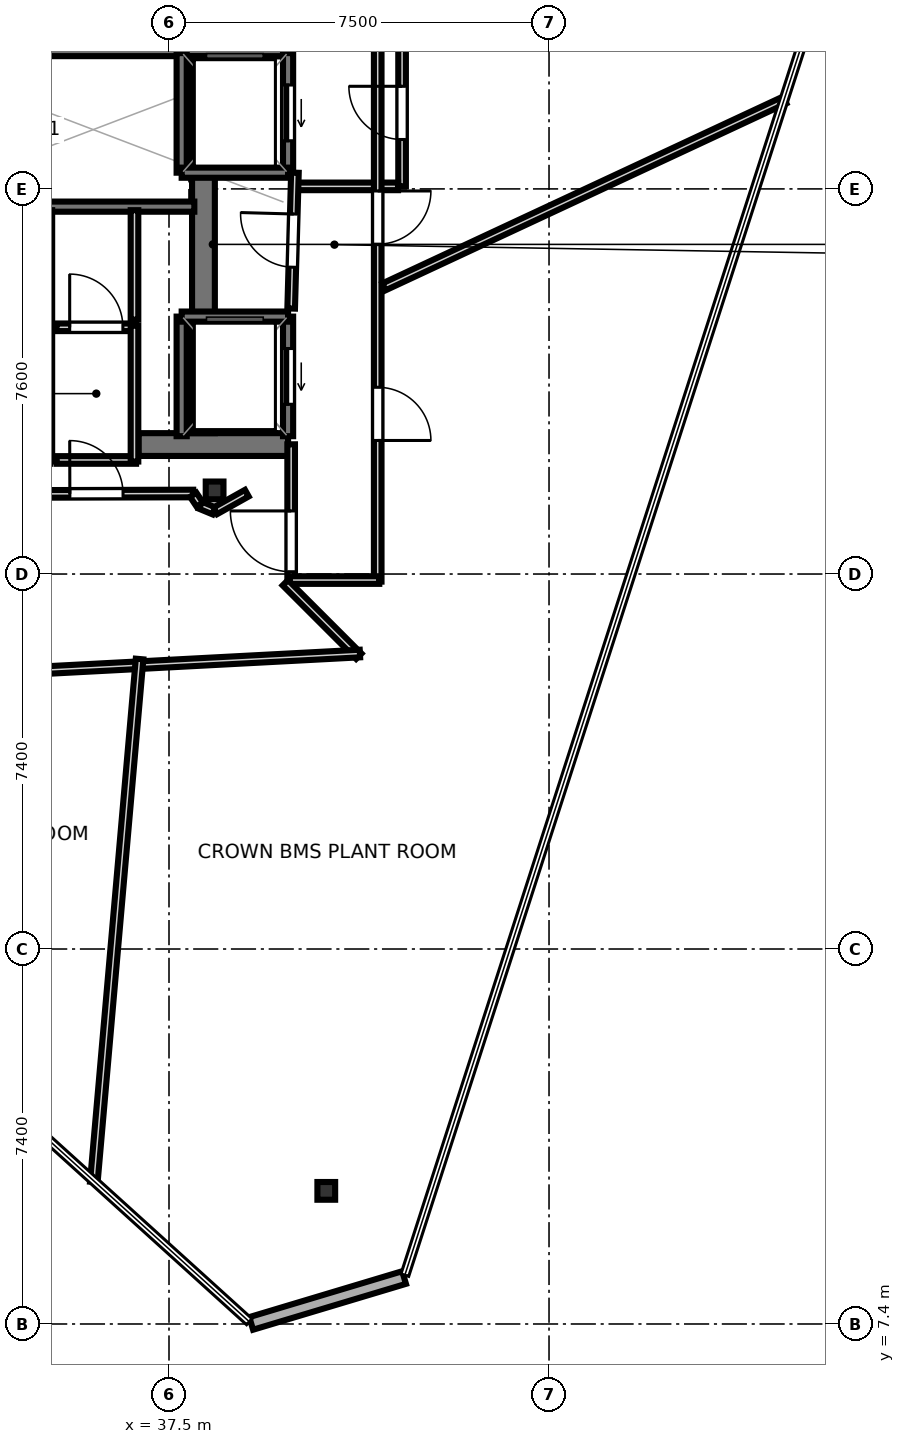
"""IFC4 building model, lengths in metres.
Left out: names, types, materials, properties, quantities, classifications, styles, units other than length and angle.
Written with IfcOpenShell. Run it as: python <this file> out.ifc"""

import sys

from ifc_helpers import new_model, si_unit, direction, frame, frame_2d, origin, origin_2d, place, context, subcontext, project, spatial, rectangle, i_section, extrude, element, fill, save


model = new_model("IFC4")
c1 = context("Model", 3, precision=1e-05, world=origin(), true_north=direction((0.0, 1.0)))
c2 = subcontext(c1, "Body", "Model", "MODEL_VIEW")
j1 = project(units=[si_unit("LENGTHUNIT", "METRE"), si_unit("PLANEANGLEUNIT", "RADIAN")], contexts=[c1])
p1 = place(None, origin())
s1 = spatial("IfcSite", under=j1, at=p1, CompositionType="ELEMENT")
p2 = place(p1, origin())
s2 = spatial("IfcBuilding", under=s1, at=p2, CompositionType="ELEMENT")
p3 = place(p2, frame((0.0, 0.0, 360.05)))
s3 = spatial("IfcBuildingStorey", under=s2, at=p3, CompositionType="ELEMENT", Elevation=360.05)
p4 = place(p3, frame((29.33, 32.645, 0.0), z_axis=(0.0, 0.0, 1.0), x_axis=(1.0, 0.0, 0.0)))
e1 = element("IfcWall", 1, at=p4, inside=s3, PredefinedType="SHEAR", context=c2, shape_type="SweptSolid", body=[
    extrude(rectangle(XDim=10.52, YDim=0.45, at=frame_2d((5.26, 0.0))), origin(), (0.0, 0.0, 1.0), 3.55),
])
p5 = place(p3, frame((36.9, 24.755, 0.0), z_axis=(0.0, 0.0, 1.0), x_axis=(1.0, 0.0, 0.0)))
e2 = element("IfcWall", 2, at=p5, inside=s3, PredefinedType="SHEAR", context=c2, shape_type="SweptSolid", body=[
    extrude(rectangle(XDim=2.95, YDim=0.45, at=frame_2d((1.475, 0.0))), origin(), (0.0, 0.0, 1.0), 3.55),
])
p6 = place(p3, frame((38.18, 24.98, 0.0), z_axis=(0.0, 0.0, 1.0), x_axis=(0.0, 1.0, 0.0)))
e3 = element("IfcWall", 3, at=p6, inside=s3, PredefinedType="SHEAR", context=c2, shape_type="SweptSolid", body=[
    extrude(rectangle(XDim=7.44, YDim=0.45, at=frame_2d((3.72, 0.0))), origin(), (0.0, 0.0, 1.0), 3.55),
])
for number, where, z_axis, x_axis in (
    (4, (38.4, 23.85, 0.0), (0.0, 0.0, 1.0), (1.0, 0.0, 0.0)),
    (5, (40.604, 10.027, 0.0), (0.0, 0.0, 1.0), (1.0, 0.0, 0.0)),
):
    element("IfcColumn", number, at=place(p3, frame(where, z_axis=z_axis, x_axis=x_axis)), inside=s3, PredefinedType="COLUMN", context=c2, shape_type="SweptSolid", body=[
        extrude(i_section(OverallWidth=0.35, OverallDepth=0.35, WebThickness=0.012, FlangeThickness=0.019, at=origin_2d()), origin(), (0.0, 0.0, 1.0), 3.75),
    ])
p7 = place(p3, frame((39.122, 7.411, 0.0), z_axis=(0.0, 0.0, 1.0), x_axis=(0.957819885919, 0.287369215712, 0.0)))
e6 = element("IfcWall", 6, at=p7, inside=s3, PredefinedType="SOLIDWALL", context=c2, shape_type="SweptSolid", body=[
    extrude(rectangle(XDim=3.15, YDim=0.26, at=frame_2d((1.575, 0.0))), origin(), (0.0, 0.0, 1.0), 3.55),
])
p8 = place(p3, frame((29.7, 29.45, 0.0), z_axis=(0.0, 0.0, 1.0), x_axis=(1.0, 0.0, 0.0)))
e7 = element("IfcWall", 7, at=p8, inside=s3, PredefinedType="SOLIDWALL", context=c2, shape_type="SweptSolid", body=[
    extrude(rectangle(XDim=8.3, YDim=0.2, at=frame_2d((4.15, 0.0))), origin(), (0.0, 0.0, 1.0), 3.55),
])
p9 = place(p8, frame((0.595, 0.0, 0.0)))
e8 = element("IfcOpeningElement", 8, at=p9, cuts=e7, PredefinedType="OPENING", context=c2, shape_type="SweptSolid", body=[
    extrude(rectangle(XDim=1.25, YDim=2.15, at=frame_2d((0.625, 1.075))), frame((0.0, 0.11, 0.0), z_axis=(0.0, -1.0, 0.0), x_axis=(1.0, 0.0, 0.0)), (0.0, 0.0, 1.0), 0.22),
])
p10 = place(p3, frame((39.85, 30.12, 0.0), z_axis=(0.0, 0.0, 1.0), x_axis=(0.0, 1.0, 0.0)))
e9 = element("IfcWall", 9, at=p10, inside=s3, PredefinedType="SOLIDWALL", context=c2, shape_type="SweptSolid", body=[
    extrude(rectangle(XDim=2.36, YDim=0.2, at=frame_2d((1.18, 0.0))), origin(), (0.0, 0.0, 1.0), 3.55),
])
p11 = place(p10, frame((0.63, 0.0, 0.0)))
e10 = element("IfcOpeningElement", 10, at=p11, cuts=e9, PredefinedType="OPENING", context=c2, shape_type="SweptSolid", body=[
    extrude(rectangle(XDim=1.1, YDim=2.15, at=frame_2d((0.55, 1.075))), frame((0.0, 0.11, 0.0), z_axis=(0.0, -1.0, 0.0), x_axis=(1.0, 0.0, 0.0)), (0.0, 0.0, 1.0), 0.22),
])
p12 = place(p3, frame((37.75, 30.12, 0.0), z_axis=(0.0, 0.0, 1.0), x_axis=(0.0, 1.0, 0.0)))
e11 = element("IfcWall", 11, at=p12, inside=s3, PredefinedType="SOLIDWALL", context=c2, shape_type="SweptSolid", body=[
    extrude(rectangle(XDim=2.36, YDim=0.2, at=frame_2d((1.18, 0.0))), origin(), (0.0, 0.0, 1.0), 3.55),
])
p13 = place(p3, frame((37.75, 30.12, 0.0), z_axis=(0.0, 0.0, 1.0), x_axis=(1.0, 0.0, 0.0)))
e12 = element("IfcWall", 12, at=p13, inside=s3, PredefinedType="SOLIDWALL", context=c2, shape_type="SweptSolid", body=[
    extrude(rectangle(XDim=2.1, YDim=0.2, at=frame_2d((1.05, 0.0))), origin(), (0.0, 0.0, 1.0), 3.55),
])
p14 = place(p3, frame((39.85, 24.92, 0.0), z_axis=(0.0, 0.0, 1.0), x_axis=(0.0, 1.0, 0.0)))
e13 = element("IfcWall", 13, at=p14, inside=s3, PredefinedType="SOLIDWALL", context=c2, shape_type="SweptSolid", body=[
    extrude(rectangle(XDim=2.36, YDim=0.2, at=frame_2d((1.18, 0.0))), origin(), (0.0, 0.0, 1.0), 3.55),
])
p15 = place(p14, frame((0.63, 0.0, 0.0)))
e14 = element("IfcOpeningElement", 14, at=p15, cuts=e13, PredefinedType="OPENING", context=c2, shape_type="SweptSolid", body=[
    extrude(rectangle(XDim=1.1, YDim=2.15, at=frame_2d((0.55, 1.075))), frame((0.0, 0.11, 0.0), z_axis=(0.0, -1.0, 0.0), x_axis=(1.0, 0.0, 0.0)), (0.0, 0.0, 1.0), 0.22),
])
p16 = place(p3, frame((37.75, 24.92, 0.0), z_axis=(0.0, 0.0, 1.0), x_axis=(0.0, 1.0, 0.0)))
e15 = element("IfcWall", 15, at=p16, inside=s3, PredefinedType="SOLIDWALL", context=c2, shape_type="SweptSolid", body=[
    extrude(rectangle(XDim=2.36, YDim=0.2, at=frame_2d((1.18, 0.0))), origin(), (0.0, 0.0, 1.0), 3.55),
])
p17 = place(p3, frame((37.75, 27.28, 0.0), z_axis=(0.0, 0.0, 1.0), x_axis=(1.0, 0.0, 0.0)))
e16 = element("IfcWall", 16, at=p17, inside=s3, PredefinedType="SOLIDWALL", context=c2, shape_type="SweptSolid", body=[
    extrude(rectangle(XDim=2.1, YDim=0.2, at=frame_2d((1.05, 0.0))), origin(), (0.0, 0.0, 1.0), 3.55),
])
p18 = place(p3, frame((42.1, 29.85, 0.0), z_axis=(0.0, 0.0, 1.0), x_axis=(0.0, 1.0, 0.0)))
e17 = element("IfcWall", 17, at=p18, inside=s3, PredefinedType="PARTITIONING", context=c2, shape_type="SweptSolid", body=[
    extrude(rectangle(XDim=2.795, YDim=0.15, at=frame_2d((1.397, 0.0))), origin(), (0.0, 0.0, 1.0), 2.87),
])
p19 = place(p18, frame((0.925, 0.0, 0.0)))
e18 = element("IfcOpeningElement", 18, at=p19, cuts=e17, PredefinedType="OPENING", context=c2, shape_type="SweptSolid", body=[
    extrude(rectangle(XDim=1.05, YDim=2.15, at=frame_2d((0.525, 1.075))), frame((0.0, 0.085, 0.0), z_axis=(0.0, -1.0, 0.0), x_axis=(1.0, 0.0, 0.0)), (0.0, 0.0, 1.0), 0.17),
])
p20 = place(p3, frame((39.96, 29.85, 0.0), z_axis=(0.0, 0.0, 1.0), x_axis=(1.0, 0.0, 0.0)))
e19 = element("IfcWall", 19, at=p20, inside=s3, PredefinedType="PARTITIONING", context=c2, shape_type="SweptSolid", body=[
    extrude(rectangle(XDim=2.06, YDim=0.15, at=frame_2d((1.03, 0.0))), origin(), (0.0, 0.0, 1.0), 2.87),
])
p21 = place(p3, frame((39.911, 22.05, 0.0), z_axis=(0.0, 0.0, 1.0), x_axis=(0.0, 1.0, 0.0)))
e20 = element("IfcWall", 20, at=p21, inside=s3, PredefinedType="PARTITIONING", context=c2, shape_type="SweptSolid", body=[
    extrude(rectangle(XDim=2.71, YDim=0.15, at=frame_2d((1.355, 0.0))), origin(), (0.0, 0.0, 1.0), 2.87),
])
p22 = place(p21, frame((0.195, 0.0, 0.0)))
e21 = element("IfcOpeningElement", 21, at=p22, cuts=e20, PredefinedType="OPENING", context=c2, shape_type="SweptSolid", body=[
    extrude(rectangle(XDim=1.2, YDim=2.15, at=frame_2d((0.6, 1.075))), frame((0.0, 0.085, 0.0), z_axis=(0.0, -1.0, 0.0), x_axis=(1.0, 0.0, 0.0)), (0.0, 0.0, 1.0), 0.17),
])
p23 = place(p3, frame((39.911, 27.439, 0.0), z_axis=(0.0, 0.0, 1.0), x_axis=(0.027673579092, 0.999617013171, 0.0)))
e22 = element("IfcWall", 22, at=p23, inside=s3, PredefinedType="PARTITIONING", context=c2, shape_type="SweptSolid", body=[
    extrude(rectangle(XDim=2.682, YDim=0.15, at=frame_2d((1.341, 0.0))), origin(), (0.0, 0.0, 1.0), 2.87),
])
p24 = place(p23, frame((0.816, 0.0, 0.0)))
e23 = element("IfcOpeningElement", 23, at=p24, cuts=e22, PredefinedType="OPENING", context=c2, shape_type="SweptSolid", body=[
    extrude(rectangle(XDim=1.05, YDim=2.15, at=frame_2d((0.525, 1.075))), frame((0.0, 0.085, 0.0), z_axis=(0.0, -1.0, 0.0), x_axis=(1.0, 0.0, 0.0)), (0.0, 0.0, 1.0), 0.17),
])
p25 = place(p3, frame((41.619, 34.8, 0.0), z_axis=(0.0, 0.0, 1.0), x_axis=(0.0, -1.0, 0.0)))
e24 = element("IfcWall", 24, at=p25, inside=s3, PredefinedType="PARTITIONING", context=c2, shape_type="SweptSolid", body=[
    extrude(rectangle(XDim=12.75, YDim=0.15, at=frame_2d((6.375, 0.0))), origin(), (0.0, 0.0, 1.0), 2.87),
])
p26 = place(p25, frame((8.915, 0.0, 0.0)))
e25 = element("IfcOpeningElement", 25, at=p26, cuts=e24, PredefinedType="OPENING", context=c2, shape_type="SweptSolid", body=[
    extrude(rectangle(XDim=1.05, YDim=2.15, at=frame_2d((0.525, 1.075))), frame((0.0, 0.085, 0.0), z_axis=(0.0, -1.0, 0.0), x_axis=(1.0, 0.0, 0.0)), (0.0, 0.0, 1.0), 0.17),
])
p27 = place(p25, frame((5.041, 0.0, 0.0)))
e26 = element("IfcOpeningElement", 26, at=p27, cuts=e24, PredefinedType="OPENING", context=c2, shape_type="SweptSolid", body=[
    extrude(rectangle(XDim=1.05, YDim=2.15, at=frame_2d((0.525, 1.075))), frame((0.0, 0.085, 0.0), z_axis=(0.0, -1.0, 0.0), x_axis=(1.0, 0.0, 0.0)), (0.0, 0.0, 1.0), 0.17),
])
p28 = place(p3, frame((41.65, 22.081, 0.0), z_axis=(0.0, 0.0, 1.0), x_axis=(-1.0, 0.0, 0.0)))
e27 = element("IfcWall", 27, at=p28, inside=s3, PredefinedType="PARTITIONING", context=c2, shape_type="SweptSolid", body=[
    extrude(rectangle(XDim=1.77, YDim=0.15, at=frame_2d((0.885, 0.0))), origin(), (0.0, 0.0, 1.0), 2.87),
])
p29 = place(p3, frame((36.85, 24.451, 0.0), z_axis=(0.0, 0.0, 1.0), x_axis=(-1.0, 0.0, 0.0)))
e28 = element("IfcWall", 28, at=p29, inside=s3, PredefinedType="PARTITIONING", context=c2, shape_type="SweptSolid", body=[
    extrude(rectangle(XDim=1.57, YDim=0.15, at=frame_2d((0.785, 0.0))), origin(), (0.0, 0.0, 1.0), 2.87),
])
p30 = place(p3, frame((35.28, 27.069, 0.0), z_axis=(0.0, 0.0, 1.0), x_axis=(1.0, 0.0, 0.0)))
e29 = element("IfcWall", 29, at=p30, inside=s3, PredefinedType="PARTITIONING", context=c2, shape_type="SweptSolid", body=[
    extrude(rectangle(XDim=1.57, YDim=0.15, at=frame_2d((0.785, 0.0))), origin(), (0.0, 0.0, 1.0), 2.87),
])
p31 = place(p30, frame((0.26, 0.0, 0.0)))
e30 = element("IfcOpeningElement", 30, at=p31, cuts=e29, PredefinedType="OPENING", context=c2, shape_type="SweptSolid", body=[
    extrude(rectangle(XDim=1.05, YDim=2.15, at=frame_2d((0.525, 1.075))), frame((0.0, 0.085, 0.0), z_axis=(0.0, -1.0, 0.0), x_axis=(1.0, 0.0, 0.0)), (0.0, 0.0, 1.0), 0.17),
])
p32 = place(p3, frame((36.819, 27.1, 0.0), z_axis=(0.0, 0.0, 1.0), x_axis=(0.0, -1.0, 0.0)))
e31 = element("IfcWall", 31, at=p32, inside=s3, PredefinedType="PARTITIONING", context=c2, shape_type="SweptSolid", body=[
    extrude(rectangle(XDim=2.68, YDim=0.15, at=frame_2d((1.34, 0.0))), origin(), (0.0, 0.0, 1.0), 2.87),
])
p33 = place(p3, frame((36.819, 29.38, 0.0), z_axis=(0.0, 0.0, 1.0), x_axis=(0.0, -1.0, 0.0)))
e32 = element("IfcWall", 32, at=p33, inside=s3, PredefinedType="PARTITIONING", context=c2, shape_type="SweptSolid", body=[
    extrude(rectangle(XDim=2.16, YDim=0.15, at=frame_2d((1.08, 0.0))), origin(), (0.0, 0.0, 1.0), 2.87),
])
p34 = place(p3, frame((29.184, 23.767, 0.0), z_axis=(0.0, 0.0, 1.0), x_axis=(0.999996878137, 0.002498742824, 0.0)))
e33 = element("IfcWall", 33, at=p34, inside=s3, PredefinedType="PARTITIONING", context=c2, shape_type="SweptSolid", body=[
    extrude(rectangle(XDim=8.793, YDim=0.15, at=frame_2d((4.397, 0.0))), origin(), (0.0, 0.0, 1.0), 2.87),
])
p35 = place(p34, frame((2.831, 0.0, 0.0)))
e34 = element("IfcOpeningElement", 34, at=p35, cuts=e33, PredefinedType="OPENING", context=c2, shape_type="SweptSolid", body=[
    extrude(rectangle(XDim=1.2, YDim=2.15, at=frame_2d((0.6, 1.075))), frame((0.0, 0.085, 0.0), z_axis=(0.0, -1.0, 0.0), x_axis=(1.0, 0.0, 0.0)), (0.0, 0.0, 1.0), 0.17),
])
p36 = place(p34, frame((6.359, 0.0, 0.0)))
e35 = element("IfcOpeningElement", 35, at=p36, cuts=e33, PredefinedType="OPENING", context=c2, shape_type="SweptSolid", body=[
    extrude(rectangle(XDim=1.05, YDim=2.15, at=frame_2d((0.525, 1.075))), frame((0.0, 0.085, 0.0), z_axis=(0.0, -1.0, 0.0), x_axis=(1.0, 0.0, 0.0)), (0.0, 0.0, 1.0), 0.17),
])
p37 = place(p34, frame((1.431, 0.0, 0.0)))
e36 = element("IfcOpeningElement", 36, at=p37, cuts=e33, PredefinedType="OPENING", context=c2, shape_type="SweptSolid", body=[
    extrude(rectangle(XDim=1.2, YDim=2.15, at=frame_2d((0.6, 1.075))), frame((0.0, 0.085, 0.0), z_axis=(0.0, -1.0, 0.0), x_axis=(1.0, 0.0, 0.0)), (0.0, 0.0, 1.0), 0.17),
])
p38 = place(p3, frame((37.978, 23.764, 0.0), z_axis=(0.0, 0.0, 1.0), x_axis=(0.556130652598, -0.831094878604, 0.0)))
e37 = element("IfcWall", 37, at=p38, inside=s3, PredefinedType="PARTITIONING", context=c2, shape_type="SweptSolid", body=[
    extrude(rectangle(XDim=0.236, YDim=0.15, at=frame_2d((0.118, 0.0))), origin(), (0.0, 0.0, 1.0), 2.87),
])
p39 = place(p3, frame((38.123, 23.556, 0.0), z_axis=(0.0, 0.0, 1.0), x_axis=(0.92383017907, -0.382802560388, 0.0)))
e38 = element("IfcWall", 38, at=p39, inside=s3, PredefinedType="PARTITIONING", context=c2, shape_type="SweptSolid", body=[
    extrude(rectangle(XDim=0.287, YDim=0.15, at=frame_2d((0.144, 0.0))), origin(), (0.0, 0.0, 1.0), 2.87),
])
p40 = place(p3, frame((38.415, 23.448, 0.0), z_axis=(0.0, 0.0, 1.0), x_axis=(0.872599584194, 0.488436245241, 0.0)))
e39 = element("IfcWall", 39, at=p40, inside=s3, PredefinedType="PARTITIONING", context=c2, shape_type="SweptSolid", body=[
    extrude(rectangle(XDim=0.712, YDim=0.15, at=frame_2d((0.356, 0.0))), origin(), (0.0, 0.0, 1.0), 2.87),
])
p41 = place(p3, frame((39.796, 22.028, 0.0), z_axis=(0.0, 0.0, 1.0), x_axis=(0.707106781187, -0.707106781187, 0.0)))
e40 = element("IfcWall", 40, at=p41, inside=s3, PredefinedType="PARTITIONING", context=c2, shape_type="SweptSolid", body=[
    extrude(rectangle(XDim=2.051, YDim=0.15, at=frame_2d((1.025, 0.0))), origin(), (0.0, 0.0, 1.0), 2.87),
])
p42 = place(p3, frame((41.268, 20.631, 0.0), z_axis=(0.0, 0.0, 1.0), x_axis=(-0.998609987024, -0.05270762579, 0.0)))
e41 = element("IfcWall", 41, at=p42, inside=s3, PredefinedType="PARTITIONING", context=c2, shape_type="SweptSolid", body=[
    extrude(rectangle(XDim=15.846, YDim=0.15, at=frame_2d((7.923, 0.0))), origin(), (0.0, 0.0, 1.0), 2.87),
])
p43 = place(p3, frame((36.919, 20.523, 0.0), z_axis=(0.0, 0.0, 1.0), x_axis=(-0.087163442528, -0.996194024418, 0.0)))
e42 = element("IfcWall", 42, at=p43, inside=s3, PredefinedType="PARTITIONING", context=c2, shape_type="SweptSolid", body=[
    extrude(rectangle(XDim=10.361, YDim=0.15, at=frame_2d((5.18, 0.0))), origin(), (0.0, 0.0, 1.0), 2.87),
])
p44 = place(p3, frame((41.743, 27.867, 0.0), z_axis=(0.0, 0.0, 1.0), x_axis=(0.906307457026, 0.422618969451, 0.0)))
e43 = element("IfcWall", 43, at=p44, inside=s3, PredefinedType="PARTITIONING", context=c2, shape_type="SweptSolid", body=[
    extrude(rectangle(XDim=8.727, YDim=0.15, at=frame_2d((4.364, 0.0))), origin(), (0.0, 0.0, 1.0), 2.87),
])
p45 = place(p11, origin())
e44 = element("IfcDoor", 44, at=p45, inside=s3, OperationType="SLIDING_TO_LEFT", PredefinedType="DOOR", context=c2, shape_type="SweptSolid", body=[
    extrude(rectangle(XDim=1.1, YDim=2.15, at=frame_2d((0.55, 1.075))), frame((0.0, 0.025, 0.0), z_axis=(0.0, -1.0, 0.0), x_axis=(1.0, 0.0, 0.0)), (0.0, 0.0, 1.0), 0.05),
])
fill(e10, e44)
p46 = place(p15, origin())
e45 = element("IfcDoor", 45, at=p46, inside=s3, OperationType="SLIDING_TO_LEFT", PredefinedType="DOOR", context=c2, shape_type="SweptSolid", body=[
    extrude(rectangle(XDim=1.1, YDim=2.15, at=frame_2d((0.55, 1.075))), frame((0.0, 0.025, 0.0), z_axis=(0.0, -1.0, 0.0), x_axis=(1.0, 0.0, 0.0)), (0.0, 0.0, 1.0), 0.05),
])
fill(e14, e45)
p47 = place(p19, origin())
e46 = element("IfcDoor", 46, at=p47, inside=s3, OperationType="SINGLE_SWING_RIGHT", PredefinedType="DOOR", context=c2, shape_type="SweptSolid", body=[
    extrude(rectangle(XDim=1.05, YDim=2.15, at=frame_2d((0.525, 1.075))), frame((0.0, 0.025, 0.0), z_axis=(0.0, -1.0, 0.0), x_axis=(1.0, 0.0, 0.0)), (0.0, 0.0, 1.0), 0.05),
])
fill(e18, e46)
p48 = place(p22, origin())
e47 = element("IfcDoor", 47, at=p48, inside=s3, OperationType="SINGLE_SWING_RIGHT", PredefinedType="DOOR", context=c2, shape_type="SweptSolid", body=[
    extrude(rectangle(XDim=1.2, YDim=2.15, at=frame_2d((0.6, 1.075))), frame((0.0, 0.025, 0.0), z_axis=(0.0, -1.0, 0.0), x_axis=(1.0, 0.0, 0.0)), (0.0, 0.0, 1.0), 0.05),
])
fill(e21, e47)
p49 = place(p36, origin())
e48 = element("IfcDoor", 48, at=p49, inside=s3, OperationType="SINGLE_SWING_LEFT", PredefinedType="DOOR", context=c2, shape_type="SweptSolid", body=[
    extrude(rectangle(XDim=1.05, YDim=2.15, at=frame_2d((0.525, 1.075))), frame((0.0, 0.025, 0.0), z_axis=(0.0, -1.0, 0.0), x_axis=(1.0, 0.0, 0.0)), (0.0, 0.0, 1.0), 0.05),
])
fill(e35, e48)
p50 = place(p31, origin())
e49 = element("IfcDoor", 49, at=p50, inside=s3, OperationType="SINGLE_SWING_LEFT", PredefinedType="DOOR", context=c2, shape_type="SweptSolid", body=[
    extrude(rectangle(XDim=1.05, YDim=2.15, at=frame_2d((0.525, 1.075))), frame((0.0, 0.025, 0.0), z_axis=(0.0, -1.0, 0.0), x_axis=(1.0, 0.0, 0.0)), (0.0, 0.0, 1.0), 0.05),
])
fill(e30, e49)
p51 = place(p26, origin())
e50 = element("IfcDoor", 50, at=p51, inside=s3, OperationType="SINGLE_SWING_RIGHT", PredefinedType="DOOR", context=c2, shape_type="SweptSolid", body=[
    extrude(rectangle(XDim=1.05, YDim=2.15, at=frame_2d((0.525, 1.075))), frame((0.0, 0.025, 0.0), z_axis=(0.0, -1.0, 0.0), x_axis=(1.0, 0.0, 0.0)), (0.0, 0.0, 1.0), 0.05),
])
fill(e25, e50)
p52 = place(p27, origin())
e51 = element("IfcDoor", 51, at=p52, inside=s3, OperationType="SINGLE_SWING_LEFT", PredefinedType="DOOR", context=c2, shape_type="SweptSolid", body=[
    extrude(rectangle(XDim=1.05, YDim=2.15, at=frame_2d((0.525, 1.075))), frame((0.0, 0.025, 0.0), z_axis=(0.0, -1.0, 0.0), x_axis=(1.0, 0.0, 0.0)), (0.0, 0.0, 1.0), 0.05),
])
fill(e26, e51)
p53 = place(p24, origin())
e52 = element("IfcDoor", 52, at=p53, inside=s3, OperationType="SINGLE_SWING_RIGHT", PredefinedType="DOOR", context=c2, shape_type="SweptSolid", body=[
    extrude(rectangle(XDim=1.05, YDim=2.15, at=frame_2d((0.525, 1.075))), frame((0.0, 0.025, 0.0), z_axis=(0.0, -1.0, 0.0), x_axis=(1.0, 0.0, 0.0)), (0.0, 0.0, 1.0), 0.05),
])
fill(e23, e52)
save(model, sys.argv[1])
